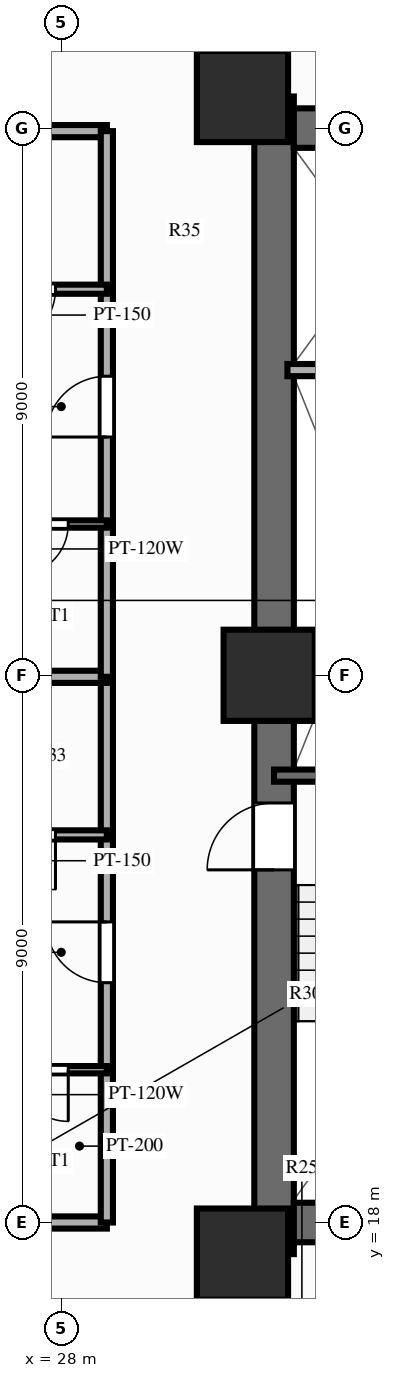
"""IFC4 building model, lengths in metres.
Left out: names, types, materials, properties, quantities, classifications, styles, units other than length and angle.
Written with IfcOpenShell. Run it as: python <this file> out.ifc"""

import sys

from ifc_helpers import new_model, si_unit, direction, frame, frame_2d, origin, origin_2d, place, context, subcontext, project, spatial, rectangle, extrude, source, transform, mapped, element, fill, save


model = new_model("IFC4")
c1 = context("Model", 3, precision=1e-05, world=origin(), true_north=direction((0.0, 1.0)))
c2 = subcontext(c1, "Body", "Model", "MODEL_VIEW")
j1 = project(units=[si_unit("LENGTHUNIT", "METRE"), si_unit("PLANEANGLEUNIT", "RADIAN")], contexts=[c1])
p1 = place(None, origin())
s1 = spatial("IfcSite", under=j1, at=p1, CompositionType="ELEMENT")
p2 = place(p1, origin())
s2 = spatial("IfcBuilding", under=s1, at=p2, CompositionType="ELEMENT")
p3 = place(p2, frame((0.0, 0.0, 22.4)))
s3 = spatial("IfcBuildingStorey", under=s2, at=p3, CompositionType="ELEMENT", Elevation=22.4)
p4 = place(p3, frame((31.5, 17.48, 0.0), z_axis=(0.0, 0.0, 1.0), x_axis=(0.0, 1.0, 0.0)))
e1 = element("IfcWall", 1, at=p4, inside=s3, PredefinedType="SHEAR", context=c2, shape_type="SweptSolid", body=[
    extrude(rectangle(XDim=19.04, YDim=0.65, at=frame_2d((9.52, 0.0))), origin(), (0.0, 0.0, 1.0), 3.0),
])
p5 = place(p4, frame((6.32, 0.0, 0.0)))
e2 = element("IfcOpeningElement", 2, at=p5, cuts=e1, PredefinedType="OPENING", context=c2, shape_type="SweptSolid", body=[
    extrude(rectangle(XDim=1.1, YDim=2.15, at=frame_2d((0.55, 1.075))), frame((0.0, 0.337, 0.0), z_axis=(0.0, -1.0, 0.0), x_axis=(1.0, 0.0, 0.0)), (0.0, 0.0, 1.0), 0.674),
])
p6 = place(p3, frame((31.825, 18.0, 0.0), z_axis=(0.0, 0.0, 1.0), x_axis=(1.0, 0.0, 0.0)))
e3 = element("IfcWall", 3, at=p6, inside=s3, PredefinedType="SHEAR", context=c2, shape_type="SweptSolid", body=[
    extrude(rectangle(XDim=12.35, YDim=0.65, at=frame_2d((6.175, 0.0))), origin(), (0.0, 0.0, 1.0), 3.0),
])
p7 = place(p3, frame((31.825, 36.0, 0.0), z_axis=(0.0, 0.0, 1.0), x_axis=(1.0, 0.0, 0.0)))
e4 = element("IfcWall", 4, at=p7, inside=s3, PredefinedType="SHEAR", context=c2, shape_type="SweptSolid", body=[
    extrude(rectangle(XDim=12.35, YDim=0.65, at=frame_2d((6.175, 0.0))), origin(), (0.0, 0.0, 1.0), 3.0),
])
p8 = place(p7, frame((5.125, 0.0, 0.0), z_axis=(0.0, 0.0, 1.0), x_axis=(-1.0, 0.0, 0.0)))
e5 = element("IfcOpeningElement", 5, at=p8, cuts=e4, PredefinedType="OPENING", context=c2, shape_type="SweptSolid", body=[
    extrude(rectangle(XDim=1.4, YDim=2.15, at=frame_2d((0.7, 1.075))), frame((0.0, 0.337, 0.0), z_axis=(0.0, -1.0, 0.0), x_axis=(1.0, 0.0, 0.0)), (0.0, 0.0, 1.0), 0.674),
])
m1 = source(origin(), c2, "Body", "SweptSolid", [
    extrude(rectangle(XDim=1.5, YDim=1.5, at=origin_2d()), origin(), (0.0, 0.0, 1.0), 3.0),
])
for number, where, z_axis, x_axis in (
    (6, (30.98, 17.48, 0.0), (0.0, 0.0, 1.0), (1.0, 0.0, 0.0)),
    (7, (30.98, 36.52, 0.0), (0.0, 0.0, 1.0), (1.0, 0.0, 0.0)),
    (8, (31.42, 27.0, 0.0), (0.0, 0.0, 1.0), (1.0, 0.0, 0.0)),
):
    element("IfcColumn", number, at=place(p3, frame(where, z_axis=z_axis, x_axis=x_axis)), inside=s3, PredefinedType="COLUMN", context=c2, shape_type="MappedRepresentation", body=[
        mapped(m1, transform((0.0, 0.0, 0.0), scale=1.0)),
    ])
p9 = place(p3, frame((31.5, 25.35, 0.0), z_axis=(0.0, 0.0, 1.0), x_axis=(1.0, 0.0, 0.0)))
e9 = element("IfcWall", 9, at=p9, inside=s3, PredefinedType="SOLIDWALL", context=c2, shape_type="SweptSolid", body=[
    extrude(rectangle(XDim=3.93, YDim=0.2, at=frame_2d((1.965, 0.0))), origin(), (0.0, 0.0, 1.0), 2.79),
])
p10 = place(p3, frame((31.72, 32.02, 0.0), z_axis=(0.0, 0.0, 1.0), x_axis=(1.0, 0.0, 0.0)))
e10 = element("IfcWall", 10, at=p10, inside=s3, PredefinedType="PARTITIONING", context=c2, shape_type="SweptSolid", body=[
    extrude(rectangle(XDim=2.8, YDim=0.2, at=frame_2d((1.4, 0.0))), origin(), (0.0, 0.0, 1.0), 2.79),
])
for number, where, z_axis, x_axis in (
    (11, (28.75, 18.0, 0.0), (0.0, 0.0, 1.0), (-1.0, 0.0, 0.0)),
    (12, (28.75, 35.95, 0.0), (0.0, 0.0, 1.0), (-1.0, 0.0, 0.0)),
):
    element("IfcWall", number, at=place(p3, frame(where, z_axis=z_axis, x_axis=x_axis)), inside=s3, PredefinedType="PARTITIONING", context=c2, shape_type="SweptSolid", body=[
        extrude(rectangle(XDim=16.6, YDim=0.2, at=frame_2d((8.3, 0.0))), origin(), (0.0, 0.0, 1.0), 2.24),
    ])
p11 = place(p3, frame((28.75, 18.0, 0.0), z_axis=(0.0, 0.0, 1.0), x_axis=(0.0, 1.0, 0.0)))
e13 = element("IfcWall", 13, at=p11, inside=s3, PredefinedType="PARTITIONING", context=c2, shape_type="SweptSolid", body=[
    extrude(rectangle(XDim=2.513, YDim=0.2, at=frame_2d((1.256, 0.0))), origin(), (0.0, 0.0, 1.0), 2.79),
])
p12 = place(p3, frame((28.75, 20.513, 0.0), z_axis=(0.0, 0.0, 1.0), x_axis=(0.0, 1.0, 0.0)))
e14 = element("IfcWall", 14, at=p12, inside=s3, PredefinedType="PARTITIONING", context=c2, shape_type="SweptSolid", body=[
    extrude(rectangle(XDim=3.862, YDim=0.2, at=frame_2d((1.931, 0.0))), origin(), (0.0, 0.0, 1.0), 2.79),
])
p13 = place(p12, frame((1.431, 0.0, 0.0)))
e15 = element("IfcOpeningElement", 15, at=p13, cuts=e14, PredefinedType="OPENING", context=c2, shape_type="SweptSolid", body=[
    extrude(rectangle(XDim=1.0, YDim=2.15, at=frame_2d((0.5, 1.075))), frame((0.0, 0.112, 0.0), z_axis=(0.0, -1.0, 0.0), x_axis=(1.0, 0.0, 0.0)), (0.0, 0.0, 1.0), 0.224),
])
p14 = place(p3, frame((28.75, 24.375, 0.0), z_axis=(0.0, 0.0, 1.0), x_axis=(0.0, 1.0, 0.0)))
e16 = element("IfcWall", 16, at=p14, inside=s3, PredefinedType="PARTITIONING", context=c2, shape_type="SweptSolid", body=[
    extrude(rectangle(XDim=2.6, YDim=0.2, at=frame_2d((1.3, 0.0))), origin(), (0.0, 0.0, 1.0), 2.79),
])
p15 = place(p3, frame((28.75, 20.513, 0.0), z_axis=(0.0, 0.0, 1.0), x_axis=(-1.0, 0.0, 0.0)))
e17 = element("IfcWall", 17, at=p15, inside=s3, PredefinedType="PARTITIONING", context=c2, shape_type="SweptSolid", body=[
    extrude(rectangle(XDim=2.12, YDim=0.12, at=frame_2d((1.06, 0.0))), origin(), (0.0, 0.0, 1.0), 2.79),
])
p16 = place(p15, frame((0.635, 0.0, 0.0)))
e18 = element("IfcOpeningElement", 18, at=p16, cuts=e17, PredefinedType="OPENING", context=c2, shape_type="SweptSolid", body=[
    extrude(rectangle(XDim=0.85, YDim=2.05, at=frame_2d((0.425, 1.025))), frame((0.0, 0.072, 0.0), z_axis=(0.0, -1.0, 0.0), x_axis=(1.0, 0.0, 0.0)), (0.0, 0.0, 1.0), 0.144),
])
p17 = place(p3, frame((28.75, 24.375, 0.0), z_axis=(0.0, 0.0, 1.0), x_axis=(-1.0, 0.0, 0.0)))
e19 = element("IfcWall", 19, at=p17, inside=s3, PredefinedType="PARTITIONING", context=c2, shape_type="SweptSolid", body=[
    extrude(rectangle(XDim=2.59, YDim=0.15, at=frame_2d((1.295, 0.0))), origin(), (0.0, 0.0, 1.0), 2.79),
])
p18 = place(p17, frame((0.845, 0.0, 0.0)))
e20 = element("IfcOpeningElement", 20, at=p18, cuts=e19, PredefinedType="OPENING", context=c2, shape_type="SweptSolid", body=[
    extrude(rectangle(XDim=0.9, YDim=2.1, at=frame_2d((0.45, 1.05))), frame((0.0, 0.087, 0.0), z_axis=(0.0, -1.0, 0.0), x_axis=(1.0, 0.0, 0.0)), (0.0, 0.0, 1.0), 0.174),
])
p19 = place(p3, frame((28.75, 26.975, 0.0), z_axis=(0.0, 0.0, 1.0), x_axis=(-1.0, 0.0, 0.0)))
e21 = element("IfcWall", 21, at=p19, inside=s3, PredefinedType="PARTITIONING", context=c2, shape_type="SweptSolid", body=[
    extrude(rectangle(XDim=16.6, YDim=0.2, at=frame_2d((8.3, 0.0))), origin(), (0.0, 0.0, 1.0), 2.79),
])
p20 = place(p3, frame((28.75, 26.975, 0.0), z_axis=(0.0, 0.0, 1.0), x_axis=(0.0, 1.0, 0.0)))
e22 = element("IfcWall", 22, at=p20, inside=s3, PredefinedType="PARTITIONING", context=c2, shape_type="SweptSolid", body=[
    extrude(rectangle(XDim=2.513, YDim=0.2, at=frame_2d((1.256, 0.0))), origin(), (0.0, 0.0, 1.0), 2.79),
])
p21 = place(p3, frame((28.75, 29.488, 0.0), z_axis=(0.0, 0.0, 1.0), x_axis=(0.0, 1.0, 0.0)))
e23 = element("IfcWall", 23, at=p21, inside=s3, PredefinedType="PARTITIONING", context=c2, shape_type="SweptSolid", body=[
    extrude(rectangle(XDim=3.862, YDim=0.2, at=frame_2d((1.931, 0.0))), origin(), (0.0, 0.0, 1.0), 2.79),
])
p22 = place(p21, frame((1.431, 0.0, 0.0)))
e24 = element("IfcOpeningElement", 24, at=p22, cuts=e23, PredefinedType="OPENING", context=c2, shape_type="SweptSolid", body=[
    extrude(rectangle(XDim=1.0, YDim=2.15, at=frame_2d((0.5, 1.075))), frame((0.0, 0.112, 0.0), z_axis=(0.0, -1.0, 0.0), x_axis=(1.0, 0.0, 0.0)), (0.0, 0.0, 1.0), 0.224),
])
p23 = place(p3, frame((28.75, 33.35, 0.0), z_axis=(0.0, 0.0, 1.0), x_axis=(0.0, 1.0, 0.0)))
e25 = element("IfcWall", 25, at=p23, inside=s3, PredefinedType="PARTITIONING", context=c2, shape_type="SweptSolid", body=[
    extrude(rectangle(XDim=2.6, YDim=0.2, at=frame_2d((1.3, 0.0))), origin(), (0.0, 0.0, 1.0), 2.79),
])
p24 = place(p3, frame((28.75, 29.488, 0.0), z_axis=(0.0, 0.0, 1.0), x_axis=(-1.0, 0.0, 0.0)))
e26 = element("IfcWall", 26, at=p24, inside=s3, PredefinedType="PARTITIONING", context=c2, shape_type="SweptSolid", body=[
    extrude(rectangle(XDim=2.12, YDim=0.12, at=frame_2d((1.06, 0.0))), origin(), (0.0, 0.0, 1.0), 2.79),
])
p25 = place(p24, frame((0.635, 0.0, 0.0)))
e27 = element("IfcOpeningElement", 27, at=p25, cuts=e26, PredefinedType="OPENING", context=c2, shape_type="SweptSolid", body=[
    extrude(rectangle(XDim=0.85, YDim=2.05, at=frame_2d((0.425, 1.025))), frame((0.0, 0.072, 0.0), z_axis=(0.0, -1.0, 0.0), x_axis=(1.0, 0.0, 0.0)), (0.0, 0.0, 1.0), 0.144),
])
p26 = place(p3, frame((28.75, 33.35, 0.0), z_axis=(0.0, 0.0, 1.0), x_axis=(-1.0, 0.0, 0.0)))
e28 = element("IfcWall", 28, at=p26, inside=s3, PredefinedType="PARTITIONING", context=c2, shape_type="SweptSolid", body=[
    extrude(rectangle(XDim=2.59, YDim=0.15, at=frame_2d((1.295, 0.0))), origin(), (0.0, 0.0, 1.0), 2.79),
])
p27 = place(p26, frame((0.845, 0.0, 0.0)))
e29 = element("IfcOpeningElement", 29, at=p27, cuts=e28, PredefinedType="OPENING", context=c2, shape_type="SweptSolid", body=[
    extrude(rectangle(XDim=0.9, YDim=2.1, at=frame_2d((0.45, 1.05))), frame((0.0, 0.087, 0.0), z_axis=(0.0, -1.0, 0.0), x_axis=(1.0, 0.0, 0.0)), (0.0, 0.0, 1.0), 0.174),
])
m2 = source(origin(), c2, "Body", "SweptSolid", [
    extrude(rectangle(XDim=1.1, YDim=2.15, at=frame_2d((0.55, 1.075))), frame((0.0, 0.025, 0.0), z_axis=(0.0, -1.0, 0.0), x_axis=(1.0, 0.0, 0.0)), (0.0, 0.0, 1.0), 0.05),
])
p28 = place(p5, origin())
e30 = element("IfcDoor", 30, at=p28, inside=s3, OperationType="SINGLE_SWING_LEFT", PredefinedType="DOOR", context=c2, shape_type="MappedRepresentation", body=[
    mapped(m2, transform((0.0, 0.0, 0.0), scale=1.0)),
])
fill(e2, e30)
m3 = source(origin(), c2, "Body", "SweptSolid", [
    extrude(rectangle(XDim=1.0, YDim=2.15, at=frame_2d((0.5, 1.075))), frame((0.0, 0.025, 0.0), z_axis=(0.0, -1.0, 0.0), x_axis=(1.0, 0.0, 0.0)), (0.0, 0.0, 1.0), 0.05),
])
p29 = place(p13, origin())
e31 = element("IfcDoor", 31, at=p29, inside=s3, OperationType="SINGLE_SWING_RIGHT", PredefinedType="DOOR", context=c2, shape_type="MappedRepresentation", body=[
    mapped(m3, transform((0.0, 0.0, 0.0), scale=1.0)),
])
fill(e15, e31)
m4 = source(origin(), c2, "Body", "SweptSolid", [
    extrude(rectangle(XDim=0.85, YDim=2.05, at=frame_2d((0.425, 1.025))), frame((0.0, 0.025, 0.0), z_axis=(0.0, -1.0, 0.0), x_axis=(1.0, 0.0, 0.0)), (0.0, 0.0, 1.0), 0.05),
])
p30 = place(p16, origin())
e32 = element("IfcDoor", 32, at=p30, inside=s3, OperationType="SINGLE_SWING_LEFT", PredefinedType="DOOR", context=c2, shape_type="MappedRepresentation", body=[
    mapped(m4, transform((0.0, 0.0, 0.0), scale=1.0)),
])
fill(e18, e32)
m5 = source(origin(), c2, "Body", "SweptSolid", [
    extrude(rectangle(XDim=0.9, YDim=2.1, at=frame_2d((0.45, 1.05))), frame((0.0, 0.025, 0.0), z_axis=(0.0, -1.0, 0.0), x_axis=(1.0, 0.0, 0.0)), (0.0, 0.0, 1.0), 0.05),
])
p31 = place(p18, origin())
e33 = element("IfcDoor", 33, at=p31, inside=s3, OperationType="SINGLE_SWING_LEFT", PredefinedType="DOOR", context=c2, shape_type="MappedRepresentation", body=[
    mapped(m5, transform((0.0, 0.0, 0.0), scale=1.0)),
])
fill(e20, e33)
p32 = place(p22, origin())
e34 = element("IfcDoor", 34, at=p32, inside=s3, OperationType="SINGLE_SWING_LEFT", PredefinedType="DOOR", context=c2, shape_type="MappedRepresentation", body=[
    mapped(m3, transform((0.0, 0.0, 0.0), scale=1.0)),
])
fill(e24, e34)
p33 = place(p25, origin())
e35 = element("IfcDoor", 35, at=p33, inside=s3, OperationType="SINGLE_SWING_RIGHT", PredefinedType="DOOR", context=c2, shape_type="MappedRepresentation", body=[
    mapped(m4, transform((0.0, 0.0, 0.0), scale=1.0)),
])
fill(e27, e35)
p34 = place(p27, origin())
e36 = element("IfcDoor", 36, at=p34, inside=s3, OperationType="SINGLE_SWING_RIGHT", PredefinedType="DOOR", context=c2, shape_type="MappedRepresentation", body=[
    mapped(m5, transform((0.0, 0.0, 0.0), scale=1.0)),
])
fill(e29, e36)
save(model, sys.argv[1])
